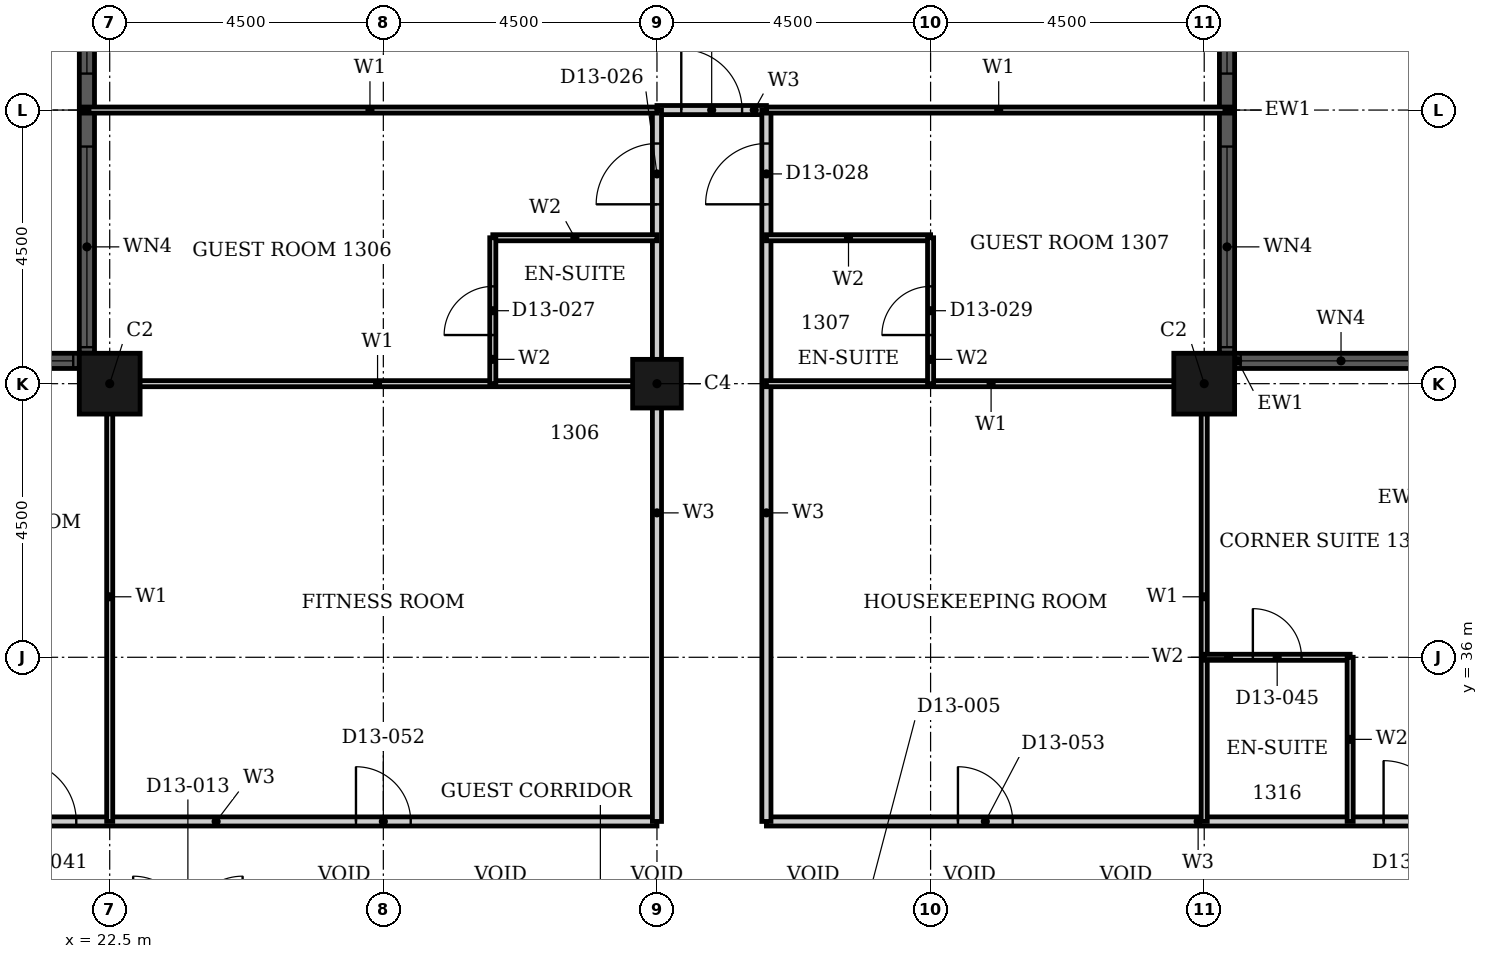
"""IFC4 building model, lengths in metres.
Left out: names, types, materials, properties, quantities, classifications, styles, units other than length and angle.
Written with IfcOpenShell. Run it as: python <this file> out.ifc"""

import sys

from ifc_helpers import new_model, si_unit, direction, frame, frame_2d, origin, origin_2d, place, context, subcontext, project, spatial, rectangle, hollow_rectangle, extrude, element, fill, save


model = new_model("IFC4")
c1 = context("Model", 3, precision=1e-05, world=origin(), true_north=direction((0.0, 1.0)))
c2 = subcontext(c1, "Body", "Model", "MODEL_VIEW")
j1 = project(units=[si_unit("LENGTHUNIT", "METRE"), si_unit("PLANEANGLEUNIT", "RADIAN")], contexts=[c1])
p1 = place(None, origin())
s1 = spatial("IfcSite", under=j1, at=p1, CompositionType="ELEMENT")
p2 = place(p1, origin())
s2 = spatial("IfcBuilding", under=s1, at=p2, CompositionType="ELEMENT")
p3 = place(p2, frame((0.0, 0.0, 60.0)))
s3 = spatial("IfcBuildingStorey", under=s2, at=p3, CompositionType="ELEMENT", Elevation=60.0)
for number, where, z_axis, x_axis in (
    (1, (40.5, 40.5, 0.0), (0.0, 0.0, 1.0), (1.0, 0.0, 0.0)),
    (2, (22.5, 40.5, 0.0), (0.0, 0.0, 1.0), (1.0, 0.0, 0.0)),
):
    element("IfcColumn", number, at=place(p3, frame(where, z_axis=z_axis, x_axis=x_axis)), inside=s3, PredefinedType="COLUMN", context=c2, shape_type="SweptSolid", body=[
        extrude(hollow_rectangle(XDim=1.0, YDim=1.0, WallThickness=0.032, at=origin_2d()), origin(), (0.0, 0.0, 1.0), 3.6),
    ])
p4 = place(p3, frame((31.5, 40.5, 0.0), z_axis=(0.0, 0.0, 1.0), x_axis=(1.0, 0.0, 0.0)))
e3 = element("IfcColumn", 3, at=p4, inside=s3, PredefinedType="COLUMN", context=c2, shape_type="SweptSolid", body=[
    extrude(hollow_rectangle(XDim=0.8, YDim=0.8, WallThickness=0.025, at=origin_2d()), origin(), (0.0, 0.0, 1.0), 3.6),
])
p5 = place(p3, frame((44.5, 40.875, 0.0), z_axis=(0.0, 0.0, 1.0), x_axis=(-1.0, 0.0, 0.0)))
e4 = element("IfcWall", 4, at=p5, inside=s3, PredefinedType="SOLIDWALL", context=c2, shape_type="SweptSolid", body=[
    extrude(rectangle(XDim=3.5, YDim=0.25, at=frame_2d((1.75, 0.0))), origin(), (0.0, 0.0, 1.0), 3.6),
])
p6 = place(p5, frame((0.1, 0.0, 0.9)))
e5 = element("IfcOpeningElement", 5, at=p6, cuts=e4, PredefinedType="OPENING", context=c2, shape_type="SweptSolid", body=[
    extrude(rectangle(XDim=3.3, YDim=2.08, at=frame_2d((1.65, 1.04))), frame((0.0, 0.135, 0.0), z_axis=(0.0, -1.0, 0.0), x_axis=(1.0, 0.0, 0.0)), (0.0, 0.0, 1.0), 0.27),
])
p7 = place(p3, frame((40.875, 41.0, 0.0), z_axis=(0.0, 0.0, 1.0), x_axis=(0.0, 1.0, 0.0)))
e6 = element("IfcWall", 6, at=p7, inside=s3, PredefinedType="SOLIDWALL", context=c2, shape_type="SweptSolid", body=[
    extrude(rectangle(XDim=8.0, YDim=0.25, at=frame_2d((4.0, 0.0))), origin(), (0.0, 0.0, 1.0), 3.6),
])
p8 = place(p7, frame((0.1, 0.0, 0.9)))
e7 = element("IfcOpeningElement", 7, at=p8, cuts=e6, PredefinedType="OPENING", context=c2, shape_type="SweptSolid", body=[
    extrude(rectangle(XDim=3.3, YDim=2.08, at=frame_2d((1.65, 1.04))), frame((0.0, 0.135, 0.0), z_axis=(0.0, -1.0, 0.0), x_axis=(1.0, 0.0, 0.0)), (0.0, 0.0, 1.0), 0.27),
])
p9 = place(p7, frame((4.6, 0.0, 0.9)))
e8 = element("IfcOpeningElement", 8, at=p9, cuts=e6, PredefinedType="OPENING", context=c2, shape_type="SweptSolid", body=[
    extrude(rectangle(XDim=3.3, YDim=2.08, at=frame_2d((1.65, 1.04))), frame((0.0, 0.135, 0.0), z_axis=(0.0, -1.0, 0.0), x_axis=(1.0, 0.0, 0.0)), (0.0, 0.0, 1.0), 0.27),
])
p10 = place(p3, frame((22.125, 49.0, 0.0), z_axis=(0.0, 0.0, 1.0), x_axis=(0.0, -1.0, 0.0)))
e9 = element("IfcWall", 9, at=p10, inside=s3, PredefinedType="SOLIDWALL", context=c2, shape_type="SweptSolid", body=[
    extrude(rectangle(XDim=8.0, YDim=0.25, at=frame_2d((4.0, 0.0))), origin(), (0.0, 0.0, 1.0), 3.6),
])
p11 = place(p10, frame((0.1, 0.0, 0.9)))
e10 = element("IfcOpeningElement", 10, at=p11, cuts=e9, PredefinedType="OPENING", context=c2, shape_type="SweptSolid", body=[
    extrude(rectangle(XDim=3.3, YDim=2.08, at=frame_2d((1.65, 1.04))), frame((0.0, 0.135, 0.0), z_axis=(0.0, -1.0, 0.0), x_axis=(1.0, 0.0, 0.0)), (0.0, 0.0, 1.0), 0.27),
])
p12 = place(p10, frame((4.6, 0.0, 0.9)))
e11 = element("IfcOpeningElement", 11, at=p12, cuts=e9, PredefinedType="OPENING", context=c2, shape_type="SweptSolid", body=[
    extrude(rectangle(XDim=3.3, YDim=2.08, at=frame_2d((1.65, 1.04))), frame((0.0, 0.135, 0.0), z_axis=(0.0, -1.0, 0.0), x_axis=(1.0, 0.0, 0.0)), (0.0, 0.0, 1.0), 0.27),
])
p13 = place(p3, frame((22.0, 40.875, 0.0), z_axis=(0.0, 0.0, 1.0), x_axis=(-1.0, 0.0, 0.0)))
e12 = element("IfcWall", 12, at=p13, inside=s3, PredefinedType="SOLIDWALL", context=c2, shape_type="SweptSolid", body=[
    extrude(rectangle(XDim=3.5, YDim=0.25, at=frame_2d((1.75, 0.0))), origin(), (0.0, 0.0, 1.0), 3.6),
])
p14 = place(p13, frame((0.1, 0.0, 0.9)))
e13 = element("IfcOpeningElement", 13, at=p14, cuts=e12, PredefinedType="OPENING", context=c2, shape_type="SweptSolid", body=[
    extrude(rectangle(XDim=3.3, YDim=2.08, at=frame_2d((1.65, 1.04))), frame((0.0, 0.135, 0.0), z_axis=(0.0, -1.0, 0.0), x_axis=(1.0, 0.0, 0.0)), (0.0, 0.0, 1.0), 0.27),
])
p15 = place(p3, frame((18.0, 33.3, 0.0), z_axis=(0.0, 0.0, 1.0), x_axis=(1.0, 0.0, 0.0)))
e14 = element("IfcWall", 14, at=p15, inside=s3, PredefinedType="PARTITIONING", context=c2, shape_type="SweptSolid", body=[
    extrude(rectangle(XDim=13.5, YDim=0.15, at=frame_2d((6.75, 0.0))), origin(), (0.0, 0.0, 1.0), 3.3),
])
p16 = place(p15, frame((2.95, 0.0, 0.0)))
e15 = element("IfcOpeningElement", 15, at=p16, cuts=e14, PredefinedType="OPENING", context=c2, shape_type="SweptSolid", body=[
    extrude(rectangle(XDim=1.0, YDim=2.1, at=frame_2d((0.5, 1.05))), frame((0.0, 0.085, 0.0), z_axis=(0.0, -1.0, 0.0), x_axis=(1.0, 0.0, 0.0)), (0.0, 0.0, 1.0), 0.17),
])
p17 = place(p15, frame((8.55, 0.0, 0.0)))
e16 = element("IfcOpeningElement", 16, at=p17, cuts=e14, PredefinedType="OPENING", context=c2, shape_type="SweptSolid", body=[
    extrude(rectangle(XDim=0.9, YDim=2.1, at=frame_2d((0.45, 1.05))), frame((0.0, 0.085, 0.0), z_axis=(0.0, -1.0, 0.0), x_axis=(1.0, 0.0, 0.0)), (0.0, 0.0, 1.0), 0.17),
])
p18 = place(p3, frame((33.3, 33.3, 0.0), z_axis=(0.0, 0.0, 1.0), x_axis=(1.0, 0.0, 0.0)))
e17 = element("IfcWall", 17, at=p18, inside=s3, PredefinedType="PARTITIONING", context=c2, shape_type="SweptSolid", body=[
    extrude(rectangle(XDim=13.5, YDim=0.15, at=frame_2d((6.75, 0.0))), origin(), (0.0, 0.0, 1.0), 3.3),
])
p19 = place(p18, frame((10.15, 0.0, 0.0)))
e18 = element("IfcOpeningElement", 18, at=p19, cuts=e17, PredefinedType="OPENING", context=c2, shape_type="SweptSolid", body=[
    extrude(rectangle(XDim=1.0, YDim=2.1, at=frame_2d((0.5, 1.05))), frame((0.0, 0.085, 0.0), z_axis=(0.0, -1.0, 0.0), x_axis=(1.0, 0.0, 0.0)), (0.0, 0.0, 1.0), 0.17),
])
p20 = place(p18, frame((3.15, 0.0, 0.0)))
e19 = element("IfcOpeningElement", 19, at=p20, cuts=e17, PredefinedType="OPENING", context=c2, shape_type="SweptSolid", body=[
    extrude(rectangle(XDim=0.9, YDim=2.1, at=frame_2d((0.45, 1.05))), frame((0.0, 0.085, 0.0), z_axis=(0.0, -1.0, 0.0), x_axis=(1.0, 0.0, 0.0)), (0.0, 0.0, 1.0), 0.17),
])
p21 = place(p3, frame((31.5, 45.0, 0.0), z_axis=(0.0, 0.0, 1.0), x_axis=(1.0, 0.0, 0.0)))
e20 = element("IfcWall", 20, at=p21, inside=s3, PredefinedType="PARTITIONING", context=c2, shape_type="SweptSolid", body=[
    extrude(rectangle(XDim=1.8, YDim=0.15, at=frame_2d((0.9, 0.0))), origin(), (0.0, 0.0, 1.0), 3.3),
])
p22 = place(p21, frame((0.4, 0.0, 0.0)))
e21 = element("IfcOpeningElement", 21, at=p22, cuts=e20, PredefinedType="OPENING", context=c2, shape_type="SweptSolid", body=[
    extrude(rectangle(XDim=1.0, YDim=2.1, at=frame_2d((0.5, 1.05))), frame((0.0, 0.085, 0.0), z_axis=(0.0, -1.0, 0.0), x_axis=(1.0, 0.0, 0.0)), (0.0, 0.0, 1.0), 0.17),
])
p23 = place(p3, frame((31.5, 33.3, 0.0), z_axis=(0.0, 0.0, 1.0), x_axis=(0.0, 1.0, 0.0)))
e22 = element("IfcWall", 22, at=p23, inside=s3, PredefinedType="PARTITIONING", context=c2, shape_type="SweptSolid", body=[
    extrude(rectangle(XDim=11.7, YDim=0.15, at=frame_2d((5.85, 0.0))), origin(), (0.0, 0.0, 1.0), 2.58),
])
p24 = place(p23, frame((10.15, 0.0, 0.0)))
e23 = element("IfcOpeningElement", 23, at=p24, cuts=e22, PredefinedType="OPENING", context=c2, shape_type="SweptSolid", body=[
    extrude(rectangle(XDim=1.0, YDim=2.1, at=frame_2d((0.5, 1.05))), frame((0.0, 0.085, 0.0), z_axis=(0.0, -1.0, 0.0), x_axis=(1.0, 0.0, 0.0)), (0.0, 0.0, 1.0), 0.17),
])
p25 = place(p3, frame((33.3, 33.3, 0.0), z_axis=(0.0, 0.0, 1.0), x_axis=(0.0, 1.0, 0.0)))
e24 = element("IfcWall", 24, at=p25, inside=s3, PredefinedType="PARTITIONING", context=c2, shape_type="SweptSolid", body=[
    extrude(rectangle(XDim=11.7, YDim=0.15, at=frame_2d((5.85, 0.0))), origin(), (0.0, 0.0, 1.0), 3.3),
])
p26 = place(p25, frame((10.15, 0.0, 0.0)))
e25 = element("IfcOpeningElement", 25, at=p26, cuts=e24, PredefinedType="OPENING", context=c2, shape_type="SweptSolid", body=[
    extrude(rectangle(XDim=1.0, YDim=2.1, at=frame_2d((0.5, 1.05))), frame((0.0, 0.085, 0.0), z_axis=(0.0, -1.0, 0.0), x_axis=(1.0, 0.0, 0.0)), (0.0, 0.0, 1.0), 0.17),
])
p27 = place(p3, frame((33.3, 40.5, 0.0), z_axis=(0.0, 0.0, 1.0), x_axis=(1.0, 0.0, 0.0)))
e26 = element("IfcWall", 26, at=p27, inside=s3, PredefinedType="PARTITIONING", context=c2, shape_type="SweptSolid", body=[
    extrude(rectangle(XDim=7.39, YDim=0.1, at=frame_2d((3.695, 0.0))), origin(), (0.0, 0.0, 1.0), 2.38),
])
p28 = place(p3, frame((22.31, 40.5, 0.0), z_axis=(0.0, 0.0, 1.0), x_axis=(1.0, 0.0, 0.0)))
e27 = element("IfcWall", 27, at=p28, inside=s3, PredefinedType="PARTITIONING", context=c2, shape_type="SweptSolid", body=[
    extrude(rectangle(XDim=9.19, YDim=0.1, at=frame_2d((4.595, 0.0))), origin(), (0.0, 0.0, 1.0), 2.38),
])
p29 = place(p3, frame((33.3, 45.0, 0.0), z_axis=(0.0, 0.0, 1.0), x_axis=(1.0, 0.0, 0.0)))
e28 = element("IfcWall", 28, at=p29, inside=s3, PredefinedType="PARTITIONING", context=c2, shape_type="SweptSolid", body=[
    extrude(rectangle(XDim=7.64, YDim=0.1, at=frame_2d((3.82, 0.0))), origin(), (0.0, 0.0, 1.0), 3.3),
])
p30 = place(p3, frame((22.06, 45.0, 0.0), z_axis=(0.0, 0.0, 1.0), x_axis=(1.0, 0.0, 0.0)))
e29 = element("IfcWall", 29, at=p30, inside=s3, PredefinedType="PARTITIONING", context=c2, shape_type="SweptSolid", body=[
    extrude(rectangle(XDim=9.44, YDim=0.1, at=frame_2d((4.72, 0.0))), origin(), (0.0, 0.0, 1.0), 3.3),
])
for number, where, z_axis, x_axis in (
    (30, (22.5, 33.3, 0.0), (0.0, 0.0, 1.0), (0.0, 1.0, 0.0)),
    (31, (40.5, 33.3, 0.0), (0.0, 0.0, 1.0), (0.0, 1.0, 0.0)),
):
    element("IfcWall", number, at=place(p3, frame(where, z_axis=z_axis, x_axis=x_axis)), inside=s3, PredefinedType="PARTITIONING", context=c2, shape_type="SweptSolid", body=[
        extrude(rectangle(XDim=7.39, YDim=0.1, at=frame_2d((3.695, 0.0))), origin(), (0.0, 0.0, 1.0), 3.3),
    ])
p31 = place(p3, frame((40.5, 36.0, 0.0), z_axis=(0.0, 0.0, 1.0), x_axis=(1.0, 0.0, 0.0)))
e32 = element("IfcWall", 32, at=p31, inside=s3, PredefinedType="PARTITIONING", context=c2, shape_type="SweptSolid", body=[
    extrude(rectangle(XDim=2.4, YDim=0.1, at=frame_2d((1.2, 0.0))), origin(), (0.0, 0.0, 1.0), 3.3),
])
p32 = place(p31, frame((0.8, 0.0, 0.0)))
e33 = element("IfcOpeningElement", 33, at=p32, cuts=e32, PredefinedType="OPENING", context=c2, shape_type="SweptSolid", body=[
    extrude(rectangle(XDim=0.8, YDim=2.1, at=frame_2d((0.4, 1.05))), frame((0.0, 0.06, 0.0), z_axis=(0.0, -1.0, 0.0), x_axis=(1.0, 0.0, 0.0)), (0.0, 0.0, 1.0), 0.12),
])
for number, where, z_axis, x_axis in (
    (34, (33.3, 42.9, 0.0), (0.0, 0.0, 1.0), (1.0, 0.0, 0.0)),
    (35, (28.8, 42.9, 0.0), (0.0, 0.0, 1.0), (1.0, 0.0, 0.0)),
):
    element("IfcWall", number, at=place(p3, frame(where, z_axis=z_axis, x_axis=x_axis)), inside=s3, PredefinedType="PARTITIONING", context=c2, shape_type="SweptSolid", body=[
        extrude(rectangle(XDim=2.7, YDim=0.1, at=frame_2d((1.35, 0.0))), origin(), (0.0, 0.0, 1.0), 3.3),
    ])
p33 = place(p3, frame((28.8, 40.5, 0.0), z_axis=(0.0, 0.0, 1.0), x_axis=(0.0, 1.0, 0.0)))
e36 = element("IfcWall", 36, at=p33, inside=s3, PredefinedType="PARTITIONING", context=c2, shape_type="SweptSolid", body=[
    extrude(rectangle(XDim=2.4, YDim=0.1, at=frame_2d((1.2, 0.0))), origin(), (0.0, 0.0, 1.0), 3.3),
])
p34 = place(p33, frame((0.8, 0.0, 0.0)))
e37 = element("IfcOpeningElement", 37, at=p34, cuts=e36, PredefinedType="OPENING", context=c2, shape_type="SweptSolid", body=[
    extrude(rectangle(XDim=0.8, YDim=2.1, at=frame_2d((0.4, 1.05))), frame((0.0, 0.06, 0.0), z_axis=(0.0, -1.0, 0.0), x_axis=(1.0, 0.0, 0.0)), (0.0, 0.0, 1.0), 0.12),
])
p35 = place(p3, frame((36.0, 40.5, 0.0), z_axis=(0.0, 0.0, 1.0), x_axis=(0.0, 1.0, 0.0)))
e38 = element("IfcWall", 38, at=p35, inside=s3, PredefinedType="PARTITIONING", context=c2, shape_type="SweptSolid", body=[
    extrude(rectangle(XDim=2.4, YDim=0.1, at=frame_2d((1.2, 0.0))), origin(), (0.0, 0.0, 1.0), 2.58),
])
p36 = place(p35, frame((0.8, 0.0, 0.0)))
e39 = element("IfcOpeningElement", 39, at=p36, cuts=e38, PredefinedType="OPENING", context=c2, shape_type="SweptSolid", body=[
    extrude(rectangle(XDim=0.8, YDim=2.1, at=frame_2d((0.4, 1.05))), frame((0.0, 0.06, 0.0), z_axis=(0.0, -1.0, 0.0), x_axis=(1.0, 0.0, 0.0)), (0.0, 0.0, 1.0), 0.12),
])
p37 = place(p3, frame((42.9, 33.3, 0.0), z_axis=(0.0, 0.0, 1.0), x_axis=(0.0, 1.0, 0.0)))
e40 = element("IfcWall", 40, at=p37, inside=s3, PredefinedType="PARTITIONING", context=c2, shape_type="SweptSolid", body=[
    extrude(rectangle(XDim=2.7, YDim=0.1, at=frame_2d((1.35, 0.0))), origin(), (0.0, 0.0, 1.0), 3.3),
])
p38 = place(p6, origin())
e41 = element("IfcWindow", 41, at=p38, inside=s3, PartitioningType="SINGLE_PANEL", PredefinedType="WINDOW", context=c2, shape_type="SweptSolid", body=[
    extrude(rectangle(XDim=3.3, YDim=2.08, at=frame_2d((1.65, 1.04))), frame((0.0, 0.03, 0.0), z_axis=(0.0, -1.0, 0.0), x_axis=(1.0, 0.0, 0.0)), (0.0, 0.0, 1.0), 0.06),
])
fill(e5, e41)
p39 = place(p8, origin())
e42 = element("IfcWindow", 42, at=p39, inside=s3, PartitioningType="SINGLE_PANEL", PredefinedType="WINDOW", context=c2, shape_type="SweptSolid", body=[
    extrude(rectangle(XDim=3.3, YDim=2.08, at=frame_2d((1.65, 1.04))), frame((0.0, 0.03, 0.0), z_axis=(0.0, -1.0, 0.0), x_axis=(1.0, 0.0, 0.0)), (0.0, 0.0, 1.0), 0.06),
])
fill(e7, e42)
p40 = place(p9, origin())
e43 = element("IfcWindow", 43, at=p40, inside=s3, PartitioningType="SINGLE_PANEL", PredefinedType="WINDOW", context=c2, shape_type="SweptSolid", body=[
    extrude(rectangle(XDim=3.3, YDim=2.08, at=frame_2d((1.65, 1.04))), frame((0.0, 0.03, 0.0), z_axis=(0.0, -1.0, 0.0), x_axis=(1.0, 0.0, 0.0)), (0.0, 0.0, 1.0), 0.06),
])
fill(e8, e43)
p41 = place(p11, origin())
e44 = element("IfcWindow", 44, at=p41, inside=s3, PartitioningType="SINGLE_PANEL", PredefinedType="WINDOW", context=c2, shape_type="SweptSolid", body=[
    extrude(rectangle(XDim=3.3, YDim=2.08, at=frame_2d((1.65, 1.04))), frame((0.0, 0.03, 0.0), z_axis=(0.0, -1.0, 0.0), x_axis=(1.0, 0.0, 0.0)), (0.0, 0.0, 1.0), 0.06),
])
fill(e10, e44)
p42 = place(p12, origin())
e45 = element("IfcWindow", 45, at=p42, inside=s3, PartitioningType="SINGLE_PANEL", PredefinedType="WINDOW", context=c2, shape_type="SweptSolid", body=[
    extrude(rectangle(XDim=3.3, YDim=2.08, at=frame_2d((1.65, 1.04))), frame((0.0, 0.03, 0.0), z_axis=(0.0, -1.0, 0.0), x_axis=(1.0, 0.0, 0.0)), (0.0, 0.0, 1.0), 0.06),
])
fill(e11, e45)
p43 = place(p14, origin())
e46 = element("IfcWindow", 46, at=p43, inside=s3, PartitioningType="SINGLE_PANEL", PredefinedType="WINDOW", context=c2, shape_type="SweptSolid", body=[
    extrude(rectangle(XDim=3.3, YDim=2.08, at=frame_2d((1.65, 1.04))), frame((0.0, 0.03, 0.0), z_axis=(0.0, -1.0, 0.0), x_axis=(1.0, 0.0, 0.0)), (0.0, 0.0, 1.0), 0.06),
])
fill(e13, e46)
p44 = place(p24, origin())
e47 = element("IfcDoor", 47, at=p44, inside=s3, OperationType="SINGLE_SWING_RIGHT", PredefinedType="DOOR", context=c2, shape_type="SweptSolid", body=[
    extrude(rectangle(XDim=1.0, YDim=2.1, at=frame_2d((0.5, 1.05))), frame((0.0, 0.025, 0.0), z_axis=(0.0, -1.0, 0.0), x_axis=(1.0, 0.0, 0.0)), (0.0, 0.0, 1.0), 0.05),
])
fill(e23, e47)
p45 = place(p34, origin())
e48 = element("IfcDoor", 48, at=p45, inside=s3, OperationType="SINGLE_SWING_RIGHT", PredefinedType="DOOR", context=c2, shape_type="SweptSolid", body=[
    extrude(rectangle(XDim=0.8, YDim=2.1, at=frame_2d((0.4, 1.05))), frame((0.0, 0.025, 0.0), z_axis=(0.0, -1.0, 0.0), x_axis=(1.0, 0.0, 0.0)), (0.0, 0.0, 1.0), 0.05),
])
fill(e37, e48)
p46 = place(p26, origin())
e49 = element("IfcDoor", 49, at=p46, inside=s3, OperationType="SINGLE_SWING_RIGHT", PredefinedType="DOOR", context=c2, shape_type="SweptSolid", body=[
    extrude(rectangle(XDim=1.0, YDim=2.1, at=frame_2d((0.5, 1.05))), frame((0.0, 0.025, 0.0), z_axis=(0.0, -1.0, 0.0), x_axis=(1.0, 0.0, 0.0)), (0.0, 0.0, 1.0), 0.05),
])
fill(e25, e49)
p47 = place(p36, origin())
e50 = element("IfcDoor", 50, at=p47, inside=s3, OperationType="SINGLE_SWING_LEFT", PredefinedType="DOOR", context=c2, shape_type="SweptSolid", body=[
    extrude(rectangle(XDim=0.8, YDim=2.1, at=frame_2d((0.4, 1.05))), frame((0.0, 0.025, 0.0), z_axis=(0.0, -1.0, 0.0), x_axis=(1.0, 0.0, 0.0)), (0.0, 0.0, 1.0), 0.05),
])
fill(e39, e50)
p48 = place(p22, origin())
e51 = element("IfcDoor", 51, at=p48, inside=s3, OperationType="SINGLE_SWING_RIGHT", PredefinedType="DOOR", context=c2, shape_type="SweptSolid", body=[
    extrude(rectangle(XDim=1.0, YDim=2.1, at=frame_2d((0.5, 1.05))), frame((0.0, 0.025, 0.0), z_axis=(0.0, -1.0, 0.0), x_axis=(1.0, 0.0, 0.0)), (0.0, 0.0, 1.0), 0.05),
])
fill(e21, e51)
p49 = place(p16, origin())
e52 = element("IfcDoor", 52, at=p49, inside=s3, OperationType="SINGLE_SWING_RIGHT", PredefinedType="DOOR", context=c2, shape_type="SweptSolid", body=[
    extrude(rectangle(XDim=1.0, YDim=2.1, at=frame_2d((0.5, 1.05))), frame((0.0, 0.025, 0.0), z_axis=(0.0, -1.0, 0.0), x_axis=(1.0, 0.0, 0.0)), (0.0, 0.0, 1.0), 0.05),
])
fill(e15, e52)
p50 = place(p19, origin())
e53 = element("IfcDoor", 53, at=p50, inside=s3, OperationType="SINGLE_SWING_RIGHT", PredefinedType="DOOR", context=c2, shape_type="SweptSolid", body=[
    extrude(rectangle(XDim=1.0, YDim=2.1, at=frame_2d((0.5, 1.05))), frame((0.0, 0.025, 0.0), z_axis=(0.0, -1.0, 0.0), x_axis=(1.0, 0.0, 0.0)), (0.0, 0.0, 1.0), 0.05),
])
fill(e18, e53)
p51 = place(p32, origin())
e54 = element("IfcDoor", 54, at=p51, inside=s3, OperationType="SINGLE_SWING_RIGHT", PredefinedType="DOOR", context=c2, shape_type="SweptSolid", body=[
    extrude(rectangle(XDim=0.8, YDim=2.1, at=frame_2d((0.4, 1.05))), frame((0.0, 0.025, 0.0), z_axis=(0.0, -1.0, 0.0), x_axis=(1.0, 0.0, 0.0)), (0.0, 0.0, 1.0), 0.05),
])
fill(e33, e54)
p52 = place(p17, origin())
e55 = element("IfcDoor", 55, at=p52, inside=s3, OperationType="SINGLE_SWING_RIGHT", PredefinedType="DOOR", context=c2, shape_type="SweptSolid", body=[
    extrude(rectangle(XDim=0.9, YDim=2.1, at=frame_2d((0.45, 1.05))), frame((0.0, 0.025, 0.0), z_axis=(0.0, -1.0, 0.0), x_axis=(1.0, 0.0, 0.0)), (0.0, 0.0, 1.0), 0.05),
])
fill(e16, e55)
p53 = place(p20, origin())
e56 = element("IfcDoor", 56, at=p53, inside=s3, OperationType="SINGLE_SWING_LEFT", PredefinedType="DOOR", context=c2, shape_type="SweptSolid", body=[
    extrude(rectangle(XDim=0.9, YDim=2.1, at=frame_2d((0.45, 1.05))), frame((0.0, 0.025, 0.0), z_axis=(0.0, -1.0, 0.0), x_axis=(1.0, 0.0, 0.0)), (0.0, 0.0, 1.0), 0.05),
])
fill(e19, e56)
save(model, sys.argv[1])
